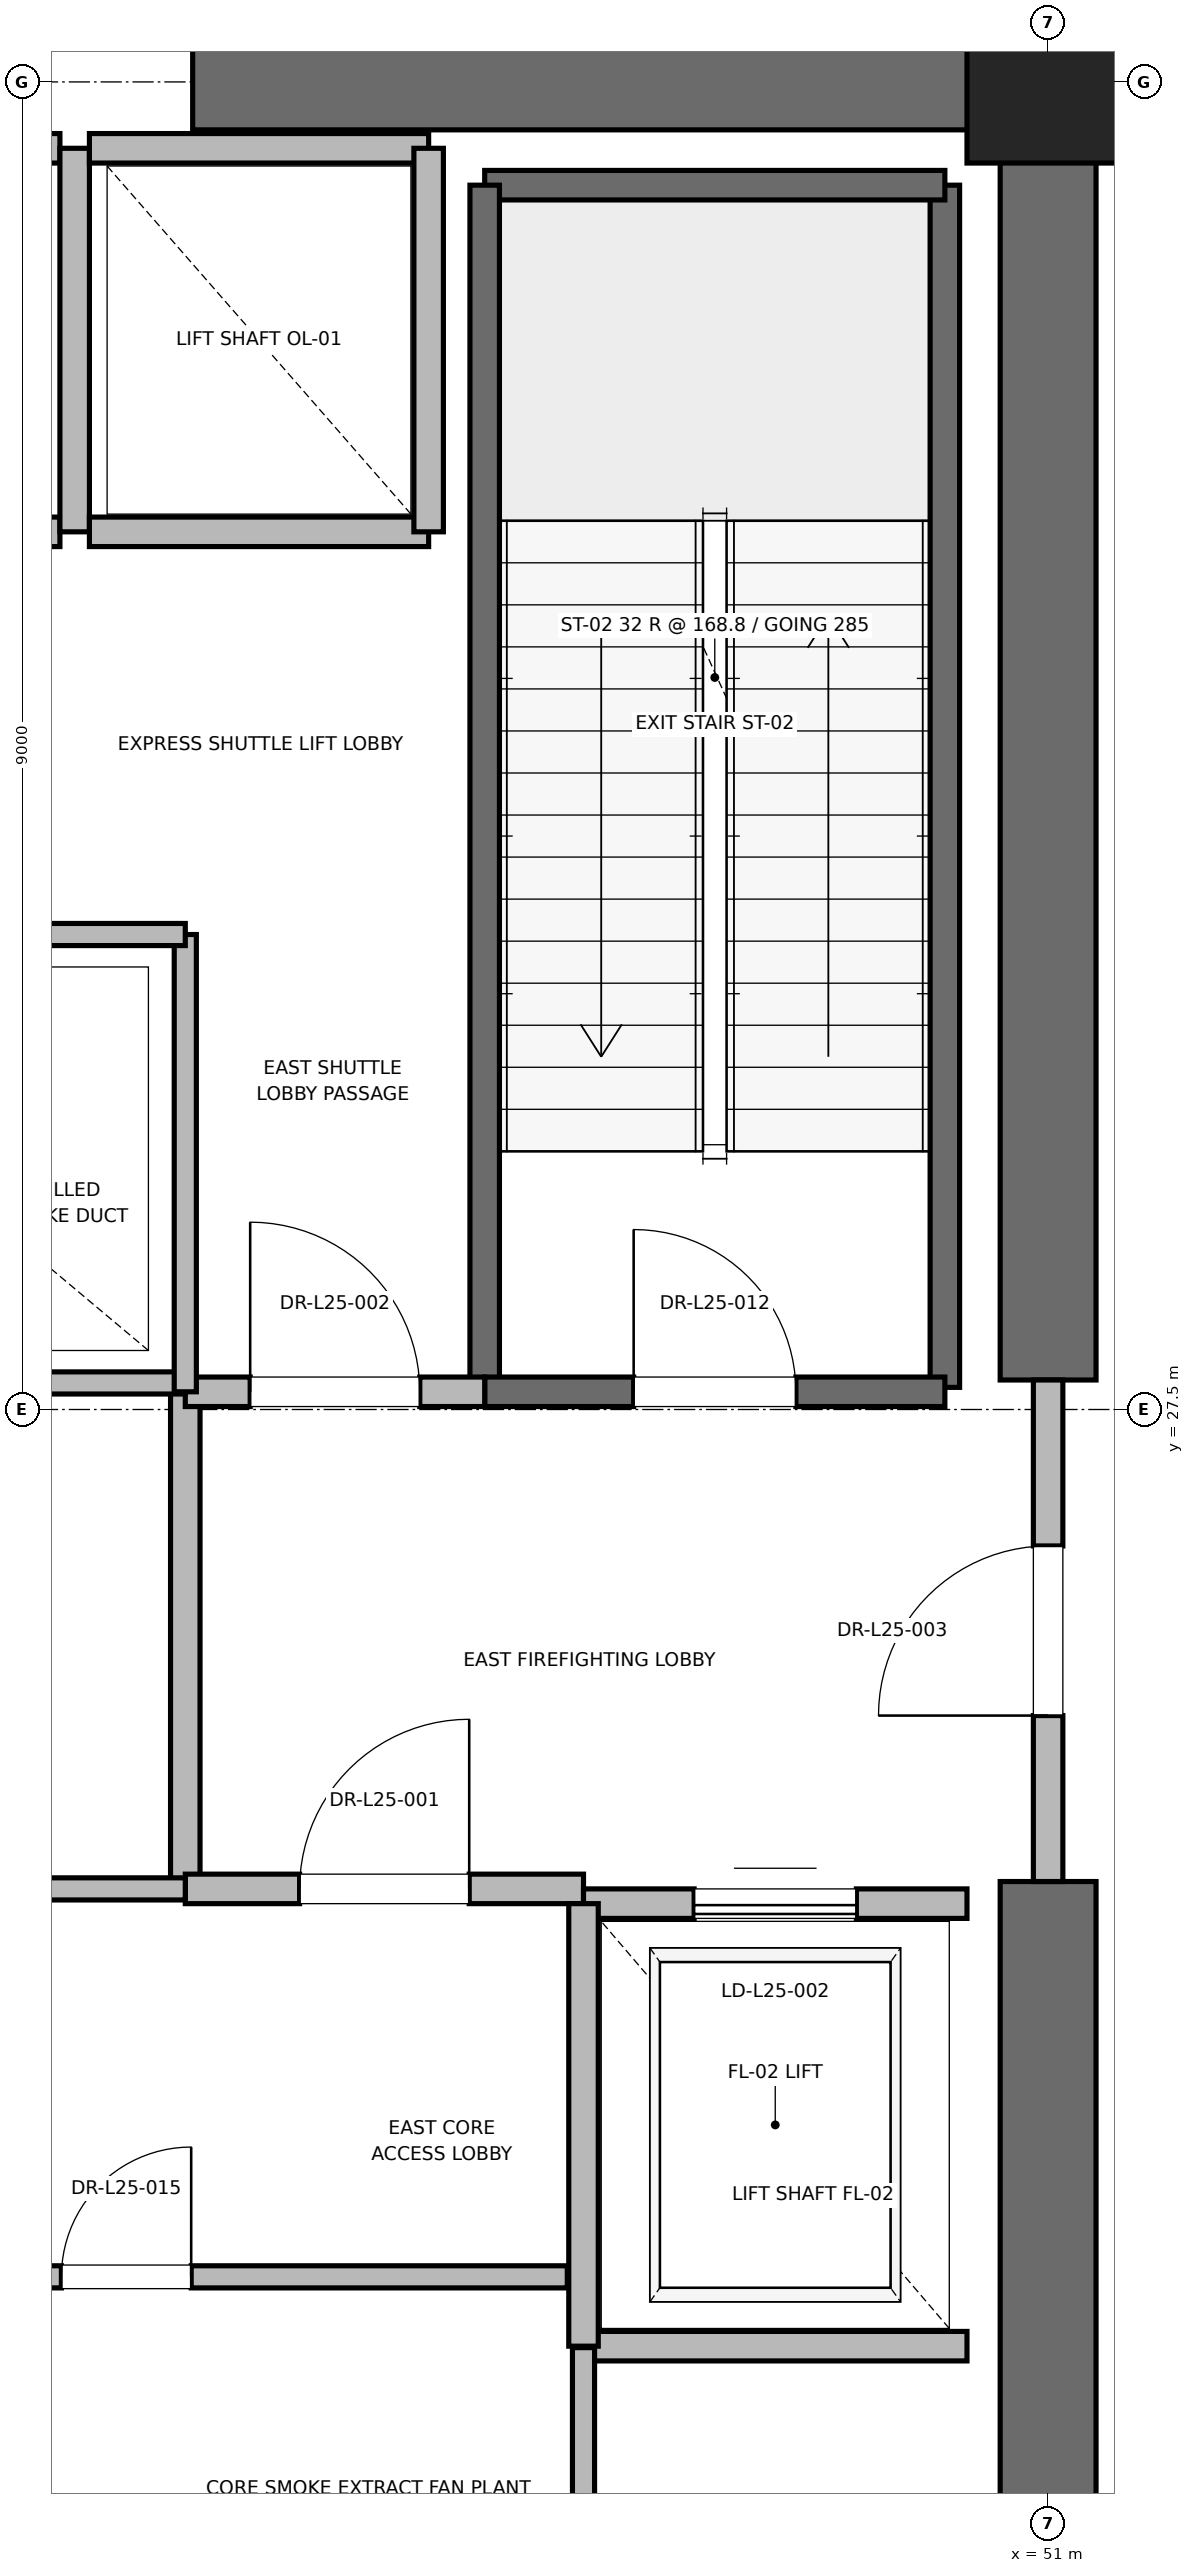
"""IFC4 building model, lengths in metres.
Left out: names, types, materials, properties, quantities, classifications, styles, units other than length and angle.
Written with IfcOpenShell. Run it as: python <this file> out.ifc"""

import sys

from ifc_helpers import new_model, si_unit, direction, frame, frame_2d, origin, origin_2d, place, context, subcontext, project, spatial, rectangle, extrude, element, fill, save


model = new_model("IFC4")
c1 = context("Model", 3, precision=1e-05, world=origin(), true_north=direction((0.0, 1.0)))
c2 = subcontext(c1, "Body", "Model", "MODEL_VIEW")
j1 = project(units=[si_unit("LENGTHUNIT", "METRE"), si_unit("PLANEANGLEUNIT", "RADIAN")], contexts=[c1])
p1 = place(None, origin())
s1 = spatial("IfcSite", under=j1, at=p1, CompositionType="ELEMENT")
p2 = place(p1, origin())
s2 = spatial("IfcBuilding", under=s1, at=p2, CompositionType="ELEMENT")
p3 = place(p2, frame((0.0, 0.0, 107.6)))
s3 = spatial("IfcBuildingStorey", under=s2, at=p3, CompositionType="ELEMENT", Elevation=107.6)
p4 = place(p3, frame((51.0, 36.5, 0.0), z_axis=(0.0, 0.0, 1.0), x_axis=(1.0, 0.0, 0.0)))
e1 = element("IfcColumn", 1, at=p4, inside=s3, PredefinedType="PILASTER", context=c2, shape_type="SweptSolid", body=[
    extrude(rectangle(XDim=1.1, YDim=1.1, at=origin_2d()), origin(), (0.0, 0.0, 1.0), 5.4),
])
for number, where, z_axis, x_axis in (
    (2, (45.2, 36.5, 0.0), (0.0, 0.0, 1.0), (1.0, 0.0, 0.0)),
    (3, (51.0, 18.5, 0.0), (0.0, 0.0, 1.0), (0.0, 1.0, 0.0)),
):
    element("IfcWall", number, at=place(p3, frame(where, z_axis=z_axis, x_axis=x_axis)), inside=s3, PredefinedType="SHEAR", context=c2, shape_type="SweptSolid", body=[
        extrude(rectangle(XDim=5.8, YDim=0.65, at=frame_2d((2.9, 0.0))), origin(), (0.0, 0.0, 1.0), 5.1),
    ])
p5 = place(p3, frame((51.0, 27.7, 0.0), z_axis=(0.0, 0.0, 1.0), x_axis=(0.0, 1.0, 0.0)))
e4 = element("IfcWall", 4, at=p5, inside=s3, PredefinedType="SHEAR", context=c2, shape_type="SweptSolid", body=[
    extrude(rectangle(XDim=8.8, YDim=0.65, at=frame_2d((4.4, 0.0))), origin(), (0.0, 0.0, 1.0), 5.1),
])
p6 = place(p3, frame((50.3, 27.65, 0.0), z_axis=(0.0, 0.0, 1.0), x_axis=(0.0, 1.0, 0.0)))
e5 = element("IfcWall", 5, at=p6, inside=s3, PredefinedType="SOLIDWALL", context=c2, shape_type="SweptSolid", body=[
    extrude(rectangle(XDim=8.15, YDim=0.2, at=frame_2d((4.075, 0.0))), origin(), (0.0, 0.0, 1.0), 5.1),
])
p7 = place(p3, frame((47.18, 35.8, 0.0), z_axis=(0.0, 0.0, 1.0), x_axis=(1.0, 0.0, 0.0)))
e6 = element("IfcWall", 6, at=p7, inside=s3, PredefinedType="SOLIDWALL", context=c2, shape_type="SweptSolid", body=[
    extrude(rectangle(XDim=3.12, YDim=0.2, at=frame_2d((1.56, 0.0))), origin(), (0.0, 0.0, 1.0), 5.1),
])
p8 = place(p3, frame((47.18, 27.62, 0.0), z_axis=(0.0, 0.0, 1.0), x_axis=(0.0, 1.0, 0.0)))
e7 = element("IfcWall", 7, at=p8, inside=s3, PredefinedType="SOLIDWALL", context=c2, shape_type="SweptSolid", body=[
    extrude(rectangle(XDim=8.18, YDim=0.2, at=frame_2d((4.09, 0.0))), origin(), (0.0, 0.0, 1.0), 5.1),
])
p9 = place(p3, frame((47.18, 27.62, 0.0), z_axis=(0.0, 0.0, 1.0), x_axis=(1.0, 0.0, 0.0)))
e8 = element("IfcWall", 8, at=p9, inside=s3, PredefinedType="SOLIDWALL", context=c2, shape_type="SweptSolid", body=[
    extrude(rectangle(XDim=3.12, YDim=0.2, at=frame_2d((1.56, 0.0))), origin(), (0.0, 0.0, 1.0), 5.1),
])
p10 = place(p9, frame((1.01, 0.0, 0.0)))
e9 = element("IfcOpeningElement", 9, at=p10, cuts=e8, PredefinedType="OPENING", context=c2, shape_type="SweptSolid", body=[
    extrude(rectangle(XDim=1.1, YDim=2.15, at=frame_2d((0.55, 1.075))), frame((0.0, 0.1, 0.0), z_axis=(0.0, -1.0, 0.0), x_axis=(1.0, 0.0, 0.0)), (0.0, 0.0, 1.0), 0.2),
])
p11 = place(p3, frame((45.15, 24.25, 0.0), z_axis=(0.0, 0.0, 1.0), x_axis=(0.0, 1.0, 0.0)))
e10 = element("IfcWall", 10, at=p11, inside=s3, PredefinedType="PARTITIONING", context=c2, shape_type="SweptSolid", body=[
    extrude(rectangle(XDim=3.37, YDim=0.2, at=frame_2d((1.685, 0.0))), origin(), (0.0, 0.0, 1.0), 5.1),
])
p12 = place(p3, frame((45.15, 24.25, 0.0), z_axis=(0.0, 0.0, 1.0), x_axis=(1.0, 0.0, 0.0)))
e11 = element("IfcWall", 11, at=p12, inside=s3, PredefinedType="PARTITIONING", context=c2, shape_type="SweptSolid", body=[
    extrude(rectangle(XDim=2.7, YDim=0.2, at=frame_2d((1.35, 0.0))), origin(), (0.0, 0.0, 1.0), 5.1),
])
p13 = place(p12, frame((0.775, 0.0, 0.0)))
e12 = element("IfcOpeningElement", 12, at=p13, cuts=e11, PredefinedType="OPENING", context=c2, shape_type="SweptSolid", body=[
    extrude(rectangle(XDim=1.15, YDim=2.2, at=frame_2d((0.575, 1.1))), frame((0.0, 0.1, 0.0), z_axis=(0.0, -1.0, 0.0), x_axis=(1.0, 0.0, 0.0)), (0.0, 0.0, 1.0), 0.2),
])
p14 = place(p3, frame((45.15, 27.62, 0.0), z_axis=(0.0, 0.0, 1.0), x_axis=(1.0, 0.0, 0.0)))
e13 = element("IfcWall", 13, at=p14, inside=s3, PredefinedType="PARTITIONING", context=c2, shape_type="SweptSolid", body=[
    extrude(rectangle(XDim=2.03, YDim=0.2, at=frame_2d((1.015, 0.0))), origin(), (0.0, 0.0, 1.0), 5.1),
])
p15 = place(p14, frame((0.44, 0.0, 0.0)))
e14 = element("IfcOpeningElement", 14, at=p15, cuts=e13, PredefinedType="OPENING", context=c2, shape_type="SweptSolid", body=[
    extrude(rectangle(XDim=1.15, YDim=2.2, at=frame_2d((0.575, 1.1))), frame((0.0, 0.1, 0.0), z_axis=(0.0, -1.0, 0.0), x_axis=(1.0, 0.0, 0.0)), (0.0, 0.0, 1.0), 0.2),
])
p16 = place(p3, frame((51.0, 24.3, 0.0), z_axis=(0.0, 0.0, 1.0), x_axis=(0.0, 1.0, 0.0)))
e15 = element("IfcWall", 15, at=p16, inside=s3, PredefinedType="PARTITIONING", context=c2, shape_type="SweptSolid", body=[
    extrude(rectangle(XDim=3.4, YDim=0.2, at=frame_2d((1.7, 0.0))), origin(), (0.0, 0.0, 1.0), 3.88),
])
p17 = place(p16, frame((1.125, 0.0, 0.0)))
e16 = element("IfcOpeningElement", 16, at=p17, cuts=e15, PredefinedType="OPENING", context=c2, shape_type="SweptSolid", body=[
    extrude(rectangle(XDim=1.15, YDim=2.2, at=frame_2d((0.575, 1.1))), frame((0.0, 0.1, 0.0), z_axis=(0.0, -1.0, 0.0), x_axis=(1.0, 0.0, 0.0)), (0.0, 0.0, 1.0), 0.2),
])
p18 = place(p3, frame((47.85, 21.15, 0.0), z_axis=(0.0, 0.0, 1.0), x_axis=(1.0, 0.0, 0.0)))
e17 = element("IfcWall", 17, at=p18, inside=s3, PredefinedType="SOLIDWALL", context=c2, shape_type="SweptSolid", body=[
    extrude(rectangle(XDim=2.6, YDim=0.2, at=frame_2d((1.3, 0.0))), origin(), (0.0, 0.0, 1.0), 5.1),
])
p19 = place(p3, frame((50.45, 24.15, 0.0), z_axis=(0.0, 0.0, 1.0), x_axis=(-1.0, 0.0, 0.0)))
e18 = element("IfcWall", 18, at=p19, inside=s3, PredefinedType="SOLIDWALL", context=c2, shape_type="SweptSolid", body=[
    extrude(rectangle(XDim=2.6, YDim=0.2, at=frame_2d((1.3, 0.0))), origin(), (0.0, 0.0, 1.0), 3.88),
])
p20 = place(p19, frame((0.75, 0.0, 0.0)))
e19 = element("IfcOpeningElement", 19, at=p20, cuts=e18, PredefinedType="OPENING", context=c2, shape_type="SweptSolid", body=[
    extrude(rectangle(XDim=1.1, YDim=2.2, at=frame_2d((0.55, 1.1))), frame((0.0, 0.1, 0.0), z_axis=(0.0, -1.0, 0.0), x_axis=(1.0, 0.0, 0.0)), (0.0, 0.0, 1.0), 0.2),
])
p21 = place(p3, frame((47.85, 24.15, 0.0), z_axis=(0.0, 0.0, 1.0), x_axis=(0.0, -1.0, 0.0)))
e20 = element("IfcWall", 20, at=p21, inside=s3, PredefinedType="SOLIDWALL", context=c2, shape_type="SweptSolid", body=[
    extrude(rectangle(XDim=3.0, YDim=0.2, at=frame_2d((1.5, 0.0))), origin(), (0.0, 0.0, 1.0), 5.1),
])
p22 = place(p3, frame((42.0, 33.45, 0.0), z_axis=(0.0, 0.0, 1.0), x_axis=(1.0, 0.0, 0.0)))
e21 = element("IfcWall", 21, at=p22, inside=s3, PredefinedType="SOLIDWALL", context=c2, shape_type="SweptSolid", body=[
    extrude(rectangle(XDim=2.3, YDim=0.2, at=frame_2d((1.15, 0.0))), origin(), (0.0, 0.0, 1.0), 5.1),
])
p23 = place(p3, frame((44.3, 36.05, 0.0), z_axis=(0.0, 0.0, 1.0), x_axis=(-1.0, 0.0, 0.0)))
e22 = element("IfcWall", 22, at=p23, inside=s3, PredefinedType="SOLIDWALL", context=c2, shape_type="SweptSolid", body=[
    extrude(rectangle(XDim=2.3, YDim=0.2, at=frame_2d((1.15, 0.0))), origin(), (0.0, 0.0, 1.0), 3.88),
])
p24 = place(p3, frame((44.4, 33.45, 0.0), z_axis=(0.0, 0.0, 1.0), x_axis=(0.0, 1.0, 0.0)))
e23 = element("IfcWall", 23, at=p24, inside=s3, PredefinedType="SOLIDWALL", context=c2, shape_type="SweptSolid", body=[
    extrude(rectangle(XDim=2.6, YDim=0.2, at=frame_2d((1.3, 0.0))), origin(), (0.0, 0.0, 1.0), 3.88),
])
p25 = place(p3, frame((44.5, 33.45, 0.0), z_axis=(0.0, 0.0, 1.0), x_axis=(1.0, 0.0, 0.0)))
e24 = element("IfcWall", 24, at=p25, inside=s3, PredefinedType="SOLIDWALL", context=c2, shape_type="SweptSolid", body=[
    extrude(rectangle(XDim=2.3, YDim=0.2, at=frame_2d((1.15, 0.0))), origin(), (0.0, 0.0, 1.0), 5.1),
])
p26 = place(p3, frame((46.8, 36.05, 0.0), z_axis=(0.0, 0.0, 1.0), x_axis=(-1.0, 0.0, 0.0)))
e25 = element("IfcWall", 25, at=p26, inside=s3, PredefinedType="SOLIDWALL", context=c2, shape_type="SweptSolid", body=[
    extrude(rectangle(XDim=2.3, YDim=0.2, at=frame_2d((1.15, 0.0))), origin(), (0.0, 0.0, 1.0), 3.88),
])
p27 = place(p3, frame((46.8, 33.45, 0.0), z_axis=(0.0, 0.0, 1.0), x_axis=(0.0, 1.0, 0.0)))
e26 = element("IfcWall", 26, at=p27, inside=s3, PredefinedType="SOLIDWALL", context=c2, shape_type="SweptSolid", body=[
    extrude(rectangle(XDim=2.6, YDim=0.2, at=frame_2d((1.3, 0.0))), origin(), (0.0, 0.0, 1.0), 5.1),
])
p28 = place(p3, frame((41.56, 27.68, 0.0), z_axis=(0.0, 0.0, 1.0), x_axis=(1.0, 0.0, 0.0)))
e27 = element("IfcWall", 27, at=p28, inside=s3, PredefinedType="PARTITIONING", context=c2, shape_type="SweptSolid", body=[
    extrude(rectangle(XDim=3.59, YDim=0.15, at=frame_2d((1.795, 0.0))), origin(), (0.0, 0.0, 1.0), 2.85),
])
p29 = place(p3, frame((47.85, 18.6, 0.0), z_axis=(0.0, 0.0, 1.0), x_axis=(0.0, 1.0, 0.0)))
e28 = element("IfcWall", 28, at=p29, inside=s3, PredefinedType="PARTITIONING", context=c2, shape_type="SweptSolid", body=[
    extrude(rectangle(XDim=2.54, YDim=0.15, at=frame_2d((1.27, 0.0))), origin(), (0.0, 0.0, 1.0), 2.85),
])
p30 = place(p3, frame((41.76, 21.62, 0.0), z_axis=(0.0, 0.0, 1.0), x_axis=(1.0, 0.0, 0.0)))
e29 = element("IfcWall", 29, at=p30, inside=s3, PredefinedType="PARTITIONING", context=c2, shape_type="SweptSolid", body=[
    extrude(rectangle(XDim=5.98, YDim=0.15, at=frame_2d((2.99, 0.0))), origin(), (0.0, 0.0, 1.0), 2.85),
])
p31 = place(p30, frame((2.55, 0.0, 0.0)))
e30 = element("IfcOpeningElement", 30, at=p31, cuts=e29, PredefinedType="OPENING", context=c2, shape_type="SweptSolid", body=[
    extrude(rectangle(XDim=0.88, YDim=2.1, at=frame_2d((0.44, 1.05))), frame((0.0, 0.075, 0.0), z_axis=(0.0, -1.0, 0.0), x_axis=(1.0, 0.0, 0.0)), (0.0, 0.0, 1.0), 0.15),
])
p32 = place(p3, frame((41.76, 24.25, 0.0), z_axis=(0.0, 0.0, 1.0), x_axis=(1.0, 0.0, 0.0)))
e31 = element("IfcWall", 31, at=p32, inside=s3, PredefinedType="PARTITIONING", context=c2, shape_type="SweptSolid", body=[
    extrude(rectangle(XDim=3.39, YDim=0.15, at=frame_2d((1.695, 0.0))), origin(), (0.0, 0.0, 1.0), 2.85),
])
p33 = place(p32, frame((1.255, 0.0, 0.0)))
e32 = element("IfcOpeningElement", 32, at=p33, cuts=e31, PredefinedType="OPENING", context=c2, shape_type="SweptSolid", body=[
    extrude(rectangle(XDim=0.88, YDim=2.1, at=frame_2d((0.44, 1.05))), frame((0.0, 0.075, 0.0), z_axis=(0.0, -1.0, 0.0), x_axis=(1.0, 0.0, 0.0)), (0.0, 0.0, 1.0), 0.15),
])
p34 = place(p3, frame((45.15, 27.62, 0.0), z_axis=(0.0, 0.0, 1.0), x_axis=(0.0, 1.0, 0.0)))
e33 = element("IfcWall", 33, at=p34, inside=s3, PredefinedType="PARTITIONING", context=c2, shape_type="SweptSolid", body=[
    extrude(rectangle(XDim=3.1, YDim=0.15, at=frame_2d((1.55, 0.0))), origin(), (0.0, 0.0, 1.0), 2.85),
])
p35 = place(p3, frame((41.56, 30.72, 0.0), z_axis=(0.0, 0.0, 1.0), x_axis=(1.0, 0.0, 0.0)))
e34 = element("IfcWall", 34, at=p35, inside=s3, PredefinedType="PARTITIONING", context=c2, shape_type="SweptSolid", body=[
    extrude(rectangle(XDim=3.59, YDim=0.15, at=frame_2d((1.795, 0.0))), origin(), (0.0, 0.0, 1.0), 2.85),
])
p36 = place(p35, frame((1.355, 0.0, 0.0)))
e35 = element("IfcOpeningElement", 35, at=p36, cuts=e34, PredefinedType="OPENING", context=c2, shape_type="SweptSolid", body=[
    extrude(rectangle(XDim=0.88, YDim=2.1, at=frame_2d((0.44, 1.05))), frame((0.0, 0.075, 0.0), z_axis=(0.0, -1.0, 0.0), x_axis=(1.0, 0.0, 0.0)), (0.0, 0.0, 1.0), 0.15),
])
p37 = place(p10, origin())
e36 = element("IfcDoor", 36, at=p37, inside=s3, OperationType="SINGLE_SWING_LEFT", PredefinedType="DOOR", context=c2, shape_type="SweptSolid", body=[
    extrude(rectangle(XDim=1.1, YDim=2.15, at=frame_2d((0.55, 1.075))), frame((0.0, 0.025, 0.0), z_axis=(0.0, -1.0, 0.0), x_axis=(1.0, 0.0, 0.0)), (0.0, 0.0, 1.0), 0.05),
])
fill(e9, e36)
p38 = place(p13, origin())
e37 = element("IfcDoor", 37, at=p38, inside=s3, OperationType="SINGLE_SWING_RIGHT", PredefinedType="DOOR", context=c2, shape_type="SweptSolid", body=[
    extrude(rectangle(XDim=1.15, YDim=2.2, at=frame_2d((0.575, 1.1))), frame((0.0, 0.025, 0.0), z_axis=(0.0, -1.0, 0.0), x_axis=(1.0, 0.0, 0.0)), (0.0, 0.0, 1.0), 0.05),
])
fill(e12, e37)
p39 = place(p15, origin())
e38 = element("IfcDoor", 38, at=p39, inside=s3, OperationType="SINGLE_SWING_LEFT", PredefinedType="DOOR", context=c2, shape_type="SweptSolid", body=[
    extrude(rectangle(XDim=1.15, YDim=2.2, at=frame_2d((0.575, 1.1))), frame((0.0, 0.025, 0.0), z_axis=(0.0, -1.0, 0.0), x_axis=(1.0, 0.0, 0.0)), (0.0, 0.0, 1.0), 0.05),
])
fill(e14, e38)
p40 = place(p17, origin())
e39 = element("IfcDoor", 39, at=p40, inside=s3, OperationType="SINGLE_SWING_LEFT", PredefinedType="DOOR", context=c2, shape_type="SweptSolid", body=[
    extrude(rectangle(XDim=1.15, YDim=2.2, at=frame_2d((0.575, 1.1))), frame((0.0, 0.025, 0.0), z_axis=(0.0, -1.0, 0.0), x_axis=(1.0, 0.0, 0.0)), (0.0, 0.0, 1.0), 0.05),
])
fill(e16, e39)
p41 = place(p20, origin())
e40 = element("IfcDoor", 40, at=p41, inside=s3, OperationType="SLIDING_TO_RIGHT", PredefinedType="DOOR", context=c2, shape_type="SweptSolid", body=[
    extrude(rectangle(XDim=1.1, YDim=2.2, at=frame_2d((0.55, 1.1))), frame((0.0, 0.025, 0.0), z_axis=(0.0, -1.0, 0.0), x_axis=(1.0, 0.0, 0.0)), (0.0, 0.0, 1.0), 0.05),
])
fill(e19, e40)
p42 = place(p31, origin())
e41 = element("IfcDoor", 41, at=p42, inside=s3, OperationType="SINGLE_SWING_RIGHT", PredefinedType="DOOR", context=c2, shape_type="SweptSolid", body=[
    extrude(rectangle(XDim=0.88, YDim=2.1, at=frame_2d((0.44, 1.05))), frame((0.0, 0.025, 0.0), z_axis=(0.0, -1.0, 0.0), x_axis=(1.0, 0.0, 0.0)), (0.0, 0.0, 1.0), 0.05),
])
fill(e30, e41)
save(model, sys.argv[1])
